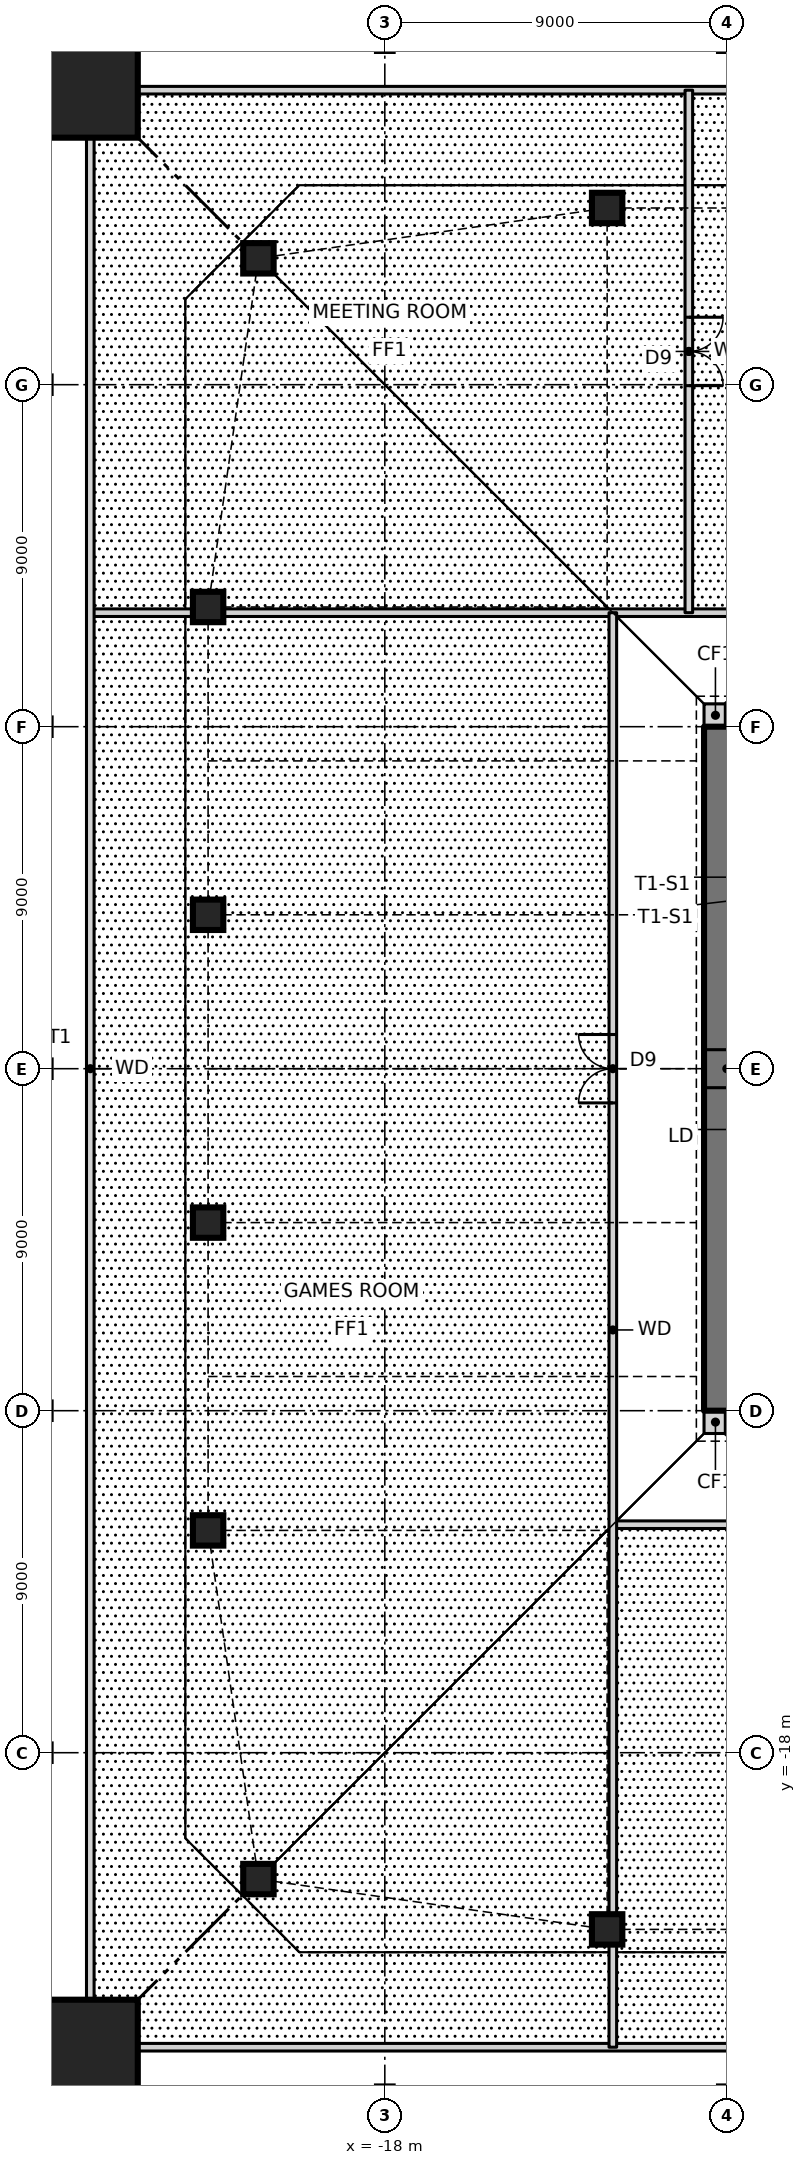
"""IFC4 building model, lengths in metres.
Left out: names, types, materials, properties, quantities, classifications, styles, units other than length and angle.
Written with IfcOpenShell. Run it as: python <this file> out.ifc"""

import sys

from ifc_helpers import new_model, si_unit, direction, frame, frame_2d, origin, origin_2d, place, context, subcontext, project, spatial, rectangle, hollow_rectangle, i_section, extrude, element, fill, save


model = new_model("IFC4")
c1 = context("Model", 3, precision=1e-05, world=origin(), true_north=direction((0.0, 1.0)))
c2 = subcontext(c1, "Body", "Model", "MODEL_VIEW")
j1 = project(units=[si_unit("LENGTHUNIT", "METRE"), si_unit("PLANEANGLEUNIT", "RADIAN")], contexts=[c1])
p1 = place(None, origin())
s1 = spatial("IfcSite", under=j1, at=p1, CompositionType="ELEMENT")
p2 = place(p1, origin())
s2 = spatial("IfcBuilding", under=s1, at=p2, CompositionType="ELEMENT")
p3 = place(p2, frame((0.0, 0.0, 10.5)))
s3 = spatial("IfcBuildingStorey", under=s2, at=p3, CompositionType="ELEMENT", Elevation=10.5)
for number, where, z_axis, x_axis in (
    (1, (-21.326, -21.326, 0.0), (0.0, 0.0, 1.0), (1.0, 0.0, 0.0)),
    (2, (-12.15, -22.65, 0.0), (0.0, 0.0, 1.0), (1.0, 0.0, 0.0)),
    (3, (-12.15, 22.65, 0.0), (0.0, 0.0, 1.0), (1.0, 0.0, 0.0)),
    (4, (-21.326, 21.326, 0.0), (0.0, 0.0, 1.0), (1.0, 0.0, 0.0)),
    (5, (-22.65, 12.15, 0.0), (0.0, 0.0, 1.0), (1.0, 0.0, 0.0)),
    (6, (-22.65, 4.05, 0.0), (0.0, 0.0, 1.0), (1.0, 0.0, 0.0)),
    (7, (-22.65, -4.05, 0.0), (0.0, 0.0, 1.0), (1.0, 0.0, 0.0)),
    (8, (-22.65, -12.15, 0.0), (0.0, 0.0, 1.0), (1.0, 0.0, 0.0)),
):
    element("IfcColumn", number, at=place(p3, frame(where, z_axis=z_axis, x_axis=x_axis)), inside=s3, PredefinedType="COLUMN", context=c2, shape_type="SweptSolid", body=[
        extrude(hollow_rectangle(XDim=0.8, YDim=0.8, WallThickness=0.09, at=origin_2d()), origin(), (0.0, 0.0, 1.0), 4.5),
    ])
for number, where, z_axis, x_axis in (
    (9, (-27.0, -27.0, 0.0), (0.0, 0.0, 1.0), (1.0, 0.0, 0.0)),
    (10, (-27.0, 27.0, 0.0), (0.0, 0.0, 1.0), (1.0, 0.0, 0.0)),
):
    element("IfcColumn", number, at=place(p3, frame(where, z_axis=z_axis, x_axis=x_axis)), inside=s3, PredefinedType="COLUMN", context=c2, shape_type="SweptSolid", body=[
        extrude(rectangle(XDim=5.0, YDim=5.0, at=origin_2d()), origin(), (0.0, 0.0, 1.0), 4.5),
        extrude(i_section(OverallWidth=0.478, OverallDepth=0.599, WebThickness=0.1, FlangeThickness=0.14, at=origin_2d()), origin(), (0.0, 0.0, 1.0), 4.5),
    ])
for number, where, z_axis, x_axis in (
    (11, (-9.6, -9.3, 0.0), (0.0, 0.0, 1.0), (1.0, 0.0, 0.0)),
    (12, (-9.6, 9.3, 0.0), (0.0, 0.0, 1.0), (1.0, 0.0, 0.0)),
):
    element("IfcWall", number, at=place(p3, frame(where, z_axis=z_axis, x_axis=x_axis)), inside=s3, PredefinedType="SOLIDWALL", context=c2, shape_type="SweptSolid", body=[
        extrude(rectangle(XDim=0.6, YDim=0.6, at=frame_2d((0.3, 0.0))), origin(), (0.0, 0.0, 1.0), 4.5),
    ])
p4 = place(p3, frame((-9.0, 9.0, 0.0), z_axis=(0.0, 0.0, 1.0), x_axis=(0.0, -1.0, 0.0)))
e13 = element("IfcWall", 13, at=p4, inside=s3, PredefinedType="SHEAR", context=c2, shape_type="SweptSolid", body=[
    extrude(rectangle(XDim=18.0, YDim=1.2, at=frame_2d((9.0, 0.0))), origin(), (0.0, 0.0, 1.0), 4.5),
])
p5 = place(p4, frame((8.5, 0.0, 0.0)))
e14 = element("IfcOpeningElement", 14, at=p5, cuts=e13, PredefinedType="OPENING", context=c2, shape_type="SweptSolid", body=[
    extrude(rectangle(XDim=1.0, YDim=2.1, at=frame_2d((0.5, 1.05))), frame((0.0, 0.61, 0.0), z_axis=(0.0, -1.0, 0.0), x_axis=(1.0, 0.0, 0.0)), (0.0, 0.0, 1.0), 1.22),
])
p6 = place(p3, frame((-25.75, -25.75, 0.0), z_axis=(0.0, 0.0, 1.0), x_axis=(1.0, 0.0, 0.0)))
e15 = element("IfcWall", 15, at=p6, inside=s3, PredefinedType="SOLIDWALL", context=c2, shape_type="SweptSolid", body=[
    extrude(rectangle(XDim=51.5, YDim=0.2, at=frame_2d((25.75, 0.0))), origin(), (0.0, 0.0, 1.0), 4.25),
])
p7 = place(p3, frame((-12.0, -12.0, 0.0), z_axis=(0.0, 0.0, 1.0), x_axis=(1.0, 0.0, 0.0)))
e16 = element("IfcWall", 16, at=p7, inside=s3, PredefinedType="SOLIDWALL", context=c2, shape_type="SweptSolid", body=[
    extrude(rectangle(XDim=37.75, YDim=0.2, at=frame_2d((18.875, 0.0))), origin(), (0.0, 0.0, 1.0), 4.25),
])
p8 = place(p7, frame((10.1, 0.0, 0.0)))
e17 = element("IfcOpeningElement", 17, at=p8, cuts=e16, PredefinedType="OPENING", context=c2, shape_type="SweptSolid", body=[
    extrude(rectangle(XDim=1.8, YDim=2.1, at=frame_2d((0.9, 1.05))), frame((0.0, 0.11, 0.0), z_axis=(0.0, -1.0, 0.0), x_axis=(1.0, 0.0, 0.0)), (0.0, 0.0, 1.0), 0.22),
])
p9 = place(p3, frame((-25.75, 12.0, 0.0), z_axis=(0.0, 0.0, 1.0), x_axis=(1.0, 0.0, 0.0)))
e18 = element("IfcWall", 18, at=p9, inside=s3, PredefinedType="SOLIDWALL", context=c2, shape_type="SweptSolid", body=[
    extrude(rectangle(XDim=37.75, YDim=0.2, at=frame_2d((18.875, 0.0))), origin(), (0.0, 0.0, 1.0), 4.25),
])
p10 = place(p9, frame((25.85, 0.0, 0.0)))
e19 = element("IfcOpeningElement", 19, at=p10, cuts=e18, PredefinedType="OPENING", context=c2, shape_type="SweptSolid", body=[
    extrude(rectangle(XDim=1.8, YDim=2.1, at=frame_2d((0.9, 1.05))), frame((0.0, 0.11, 0.0), z_axis=(0.0, -1.0, 0.0), x_axis=(1.0, 0.0, 0.0)), (0.0, 0.0, 1.0), 0.22),
])
p11 = place(p3, frame((-25.75, 25.75, 0.0), z_axis=(0.0, 0.0, 1.0), x_axis=(1.0, 0.0, 0.0)))
e20 = element("IfcWall", 20, at=p11, inside=s3, PredefinedType="SOLIDWALL", context=c2, shape_type="SweptSolid", body=[
    extrude(rectangle(XDim=51.5, YDim=0.2, at=frame_2d((25.75, 0.0))), origin(), (0.0, 0.0, 1.0), 4.25),
])
p12 = place(p3, frame((-10.0, 12.0, 0.0), z_axis=(0.0, 0.0, 1.0), x_axis=(0.0, 1.0, 0.0)))
e21 = element("IfcWall", 21, at=p12, inside=s3, PredefinedType="SOLIDWALL", context=c2, shape_type="SweptSolid", body=[
    extrude(rectangle(XDim=13.75, YDim=0.2, at=frame_2d((6.875, 0.0))), origin(), (0.0, 0.0, 1.0), 4.25),
])
p13 = place(p12, frame((5.975, 0.0, 0.0)))
e22 = element("IfcOpeningElement", 22, at=p13, cuts=e21, PredefinedType="OPENING", context=c2, shape_type="SweptSolid", body=[
    extrude(rectangle(XDim=1.8, YDim=2.1, at=frame_2d((0.9, 1.05))), frame((0.0, 0.11, 0.0), z_axis=(0.0, -1.0, 0.0), x_axis=(1.0, 0.0, 0.0)), (0.0, 0.0, 1.0), 0.22),
])
p14 = place(p3, frame((-12.0, -25.75, 0.0), z_axis=(0.0, 0.0, 1.0), x_axis=(0.0, 1.0, 0.0)))
e23 = element("IfcWall", 23, at=p14, inside=s3, PredefinedType="SOLIDWALL", context=c2, shape_type="SweptSolid", body=[
    extrude(rectangle(XDim=37.75, YDim=0.2, at=frame_2d((18.875, 0.0))), origin(), (0.0, 0.0, 1.0), 4.25),
])
p15 = place(p14, frame((24.85, 0.0, 0.0)))
e24 = element("IfcOpeningElement", 24, at=p15, cuts=e23, PredefinedType="OPENING", context=c2, shape_type="SweptSolid", body=[
    extrude(rectangle(XDim=1.8, YDim=2.1, at=frame_2d((0.9, 1.05))), frame((0.0, 0.11, 0.0), z_axis=(0.0, -1.0, 0.0), x_axis=(1.0, 0.0, 0.0)), (0.0, 0.0, 1.0), 0.22),
])
p16 = place(p3, frame((-25.75, -25.75, 0.0), z_axis=(0.0, 0.0, 1.0), x_axis=(0.0, 1.0, 0.0)))
e25 = element("IfcWall", 25, at=p16, inside=s3, PredefinedType="SOLIDWALL", context=c2, shape_type="SweptSolid", body=[
    extrude(rectangle(XDim=51.5, YDim=0.2, at=frame_2d((25.75, 0.0))), origin(), (0.0, 0.0, 1.0), 4.25),
])
p17 = place(p13, frame((1.8, 0.0, 0.0), z_axis=(0.0, 0.0, 1.0), x_axis=(-1.0, 0.0, 0.0)))
e26 = element("IfcDoor", 26, at=p17, inside=s3, OperationType="DOUBLE_DOOR_SINGLE_SWING", PredefinedType="DOOR", context=c2, shape_type="SweptSolid", body=[
    extrude(rectangle(XDim=1.8, YDim=2.1, at=frame_2d((0.9, 1.05))), frame((0.0, 0.025, 0.0), z_axis=(0.0, -1.0, 0.0), x_axis=(1.0, 0.0, 0.0)), (0.0, 0.0, 1.0), 0.05),
])
fill(e22, e26)
p18 = place(p15, origin())
e27 = element("IfcDoor", 27, at=p18, inside=s3, OperationType="DOUBLE_DOOR_SINGLE_SWING", PredefinedType="DOOR", context=c2, shape_type="SweptSolid", body=[
    extrude(rectangle(XDim=1.8, YDim=2.1, at=frame_2d((0.9, 1.05))), frame((0.0, 0.025, 0.0), z_axis=(0.0, -1.0, 0.0), x_axis=(1.0, 0.0, 0.0)), (0.0, 0.0, 1.0), 0.05),
])
fill(e24, e27)
p19 = place(p5, origin())
e28 = element("IfcDoor", 28, at=p19, inside=s3, OperationType="SINGLE_SWING_RIGHT", PredefinedType="DOOR", context=c2, shape_type="SweptSolid", body=[
    extrude(rectangle(XDim=1.0, YDim=2.1, at=frame_2d((0.5, 1.05))), frame((0.0, 0.025, 0.0), z_axis=(0.0, -1.0, 0.0), x_axis=(1.0, 0.0, 0.0)), (0.0, 0.0, 1.0), 0.05),
])
fill(e14, e28)
save(model, sys.argv[1])
